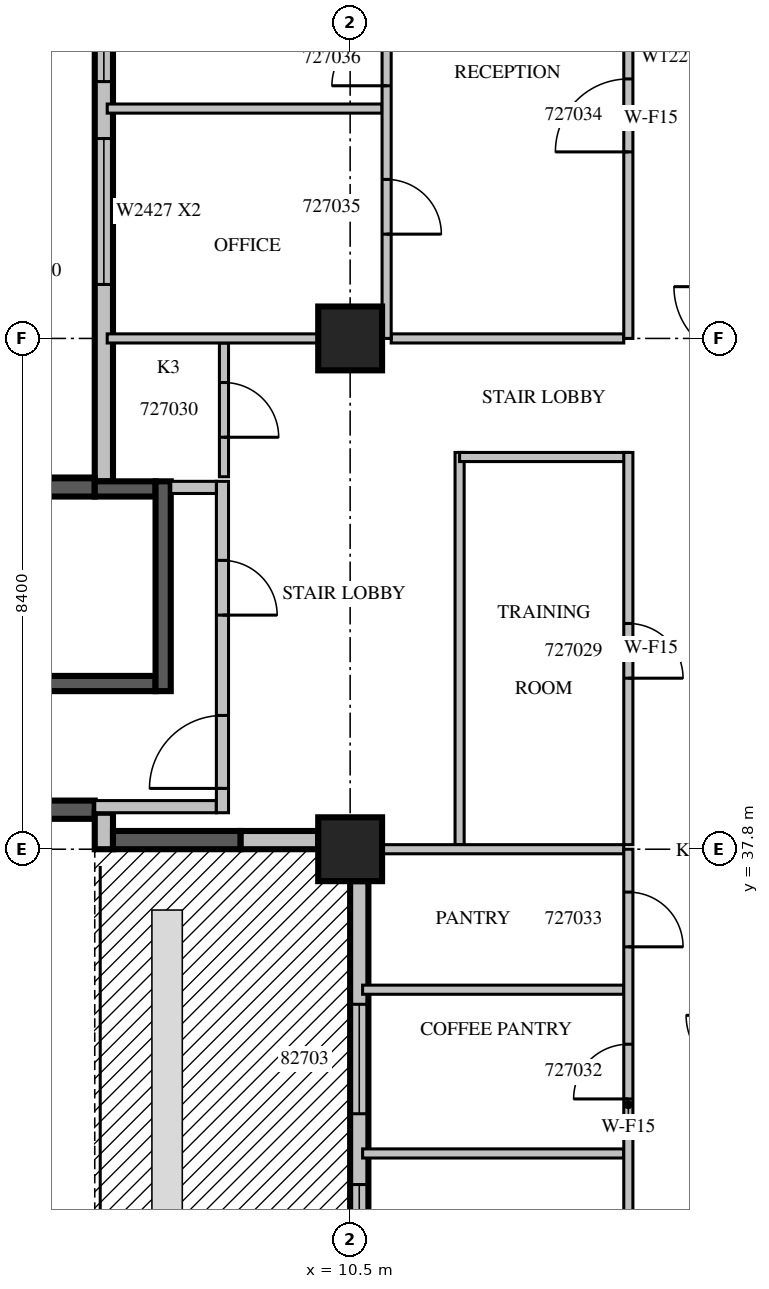
"""IFC4 building model, lengths in metres.
Left out: names, types, materials, properties, quantities, classifications, styles, units other than length and angle.
Written with IfcOpenShell. Run it as: python <this file> out.ifc"""

import sys

from ifc_helpers import new_model, si_unit, direction, frame, frame_2d, origin, origin_2d, place, context, subcontext, project, spatial, rectangle, extrude, source, transform, mapped, element, fill, save


model = new_model("IFC4")
c1 = context("Model", 3, precision=1e-05, world=origin(), true_north=direction((0.0, 1.0)))
c2 = subcontext(c1, "Body", "Model", "MODEL_VIEW")
j1 = project(units=[si_unit("LENGTHUNIT", "METRE"), si_unit("PLANEANGLEUNIT", "RADIAN")], contexts=[c1])
p1 = place(None, origin())
s1 = spatial("IfcSite", under=j1, at=p1, CompositionType="ELEMENT")
p2 = place(p1, origin())
s2 = spatial("IfcBuilding", under=s1, at=p2, CompositionType="ELEMENT")
p3 = place(p2, frame((0.0, 0.0, 124.5)))
s3 = spatial("IfcBuildingStorey", under=s2, at=p3, CompositionType="ELEMENT", Elevation=124.5)
m1 = source(origin(), c2, "Body", "SweptSolid", [
    extrude(rectangle(XDim=1.05, YDim=1.05, at=origin_2d()), origin(), (0.0, 0.0, 1.0), 4.2),
])
for number, where, z_axis, x_axis in (
    (1, (10.5, 37.8, 0.0), (0.0, 0.0, 1.0), (1.0, 0.0, 0.0)),
    (2, (10.5, 46.2, 0.0), (0.0, 0.0, 1.0), (1.0, 0.0, 0.0)),
):
    element("IfcColumn", number, at=place(p3, frame(where, z_axis=z_axis, x_axis=x_axis)), inside=s3, PredefinedType="COLUMN", context=c2, shape_type="MappedRepresentation", body=[
        mapped(m1, transform((0.0, 0.0, 0.0), scale=1.0)),
    ])
m2 = source(origin(), c2, "Body", "SweptSolid", [
    extrude(rectangle(XDim=9.91, YDim=0.3, at=frame_2d((4.955, 0.0))), origin(), (0.0, 0.0, 1.0), 3.8),
])
p4 = place(p3, frame((6.45, 53.76, 0.0), z_axis=(0.0, 0.0, 1.0), x_axis=(0.0, -1.0, 0.0)))
e3 = element("IfcWall", 3, at=p4, inside=s3, PredefinedType="STANDARD", context=c2, shape_type="MappedRepresentation", body=[
    mapped(m2, transform((0.0, 0.0, 0.0), scale=1.0)),
])
m3 = source(origin(), c2, "Body", "SweptSolid", [
    extrude(rectangle(XDim=2.4, YDim=2.7, at=frame_2d((1.2, 1.35))), frame((0.0, 0.16, 0.0), z_axis=(0.0, -1.0, 0.0), x_axis=(1.0, 0.0, 0.0)), (0.0, 0.0, 1.0), 0.32),
])
p5 = place(p4, frame((4.272, 0.0, 0.6)))
e4 = element("IfcOpeningElement", 4, at=p5, cuts=e3, PredefinedType="OPENING", context=c2, shape_type="MappedRepresentation", body=[
    mapped(m3, transform((0.0, 0.0, 0.0), scale=1.0)),
])
p6 = place(p4, frame((0.936, 0.0, 0.6)))
e5 = element("IfcOpeningElement", 5, at=p6, cuts=e3, PredefinedType="OPENING", context=c2, shape_type="MappedRepresentation", body=[
    mapped(m3, transform((0.0, 0.0, 0.0), scale=1.0)),
])
m4 = source(origin(), c2, "Body", "SweptSolid", [
    extrude(rectangle(XDim=6.1, YDim=0.3, at=frame_2d((3.05, 0.0))), origin(), (0.0, 0.0, 1.0), 3.8),
])
for number, where, z_axis, x_axis in (
    (6, (6.3, 43.75, 0.0), (0.0, 0.0, 1.0), (-1.0, 0.0, 0.0)),
    (7, (0.2, 38.45, 0.0), (0.0, 0.0, 1.0), (1.0, 0.0, 0.0)),
):
    element("IfcWall", number, at=place(p3, frame(where, z_axis=z_axis, x_axis=x_axis)), inside=s3, PredefinedType="SOLIDWALL", context=c2, shape_type="MappedRepresentation", body=[
        mapped(m4, transform((0.0, 0.0, 0.0), scale=1.0)),
    ])
p7 = place(p3, frame((6.45, 38.4, 0.0), z_axis=(0.0, 0.0, 1.0), x_axis=(0.0, -1.0, 0.0)))
e8 = element("IfcWall", 8, at=p7, inside=s3, PredefinedType="STANDARD", context=c2, shape_type="SweptSolid", body=[
    extrude(rectangle(XDim=0.6, YDim=0.3, at=frame_2d((0.3, 0.0))), origin(), (0.0, 0.0, 1.0), 3.8),
])
p8 = place(p3, frame((6.6, 37.95, 0.0), z_axis=(0.0, 0.0, 1.0), x_axis=(1.0, 0.0, 0.0)))
e9 = element("IfcWall", 9, at=p8, inside=s3, PredefinedType="SOLIDWALL", context=c2, shape_type="SweptSolid", body=[
    extrude(rectangle(XDim=2.1, YDim=0.3, at=frame_2d((1.05, 0.0))), origin(), (0.0, 0.0, 1.0), 3.8),
])
p9 = place(p3, frame((8.7, 37.95, 0.0), z_axis=(0.0, 0.0, 1.0), x_axis=(1.0, 0.0, 0.0)))
e10 = element("IfcWall", 10, at=p9, inside=s3, PredefinedType="STANDARD", context=c2, shape_type="SweptSolid", body=[
    extrude(rectangle(XDim=1.275, YDim=0.3, at=frame_2d((0.637, 0.0))), origin(), (0.0, 0.0, 1.0), 3.8),
])
m5 = source(origin(), c2, "Body", "SweptSolid", [
    extrude(rectangle(XDim=7.35, YDim=0.3, at=frame_2d((3.675, 0.0))), origin(), (0.0, 0.0, 1.0), 3.8),
])
p10 = place(p3, frame((10.65, 37.275, 0.0), z_axis=(0.0, 0.0, 1.0), x_axis=(0.0, -1.0, 0.0)))
e11 = element("IfcWall", 11, at=p10, inside=s3, PredefinedType="STANDARD", context=c2, shape_type="MappedRepresentation", body=[
    mapped(m5, transform((0.0, 0.0, 0.0), scale=1.0)),
])
m6 = source(origin(), c2, "Body", "SweptSolid", [
    extrude(rectangle(XDim=1.8, YDim=2.4, at=frame_2d((0.9, 1.2))), frame((0.0, 0.16, 0.0), z_axis=(0.0, -1.0, 0.0), x_axis=(1.0, 0.0, 0.0)), (0.0, 0.0, 1.0), 0.32),
])
p11 = place(p10, frame((2.025, 0.0, 0.0)))
e12 = element("IfcOpeningElement", 12, at=p11, cuts=e11, PredefinedType="OPENING", context=c2, shape_type="MappedRepresentation", body=[
    mapped(m6, transform((0.0, 0.0, 0.0), scale=1.0)),
])
m7 = source(origin(), c2, "Body", "SweptSolid", [
    extrude(rectangle(XDim=1.2, YDim=2.7, at=frame_2d((0.6, 1.35))), frame((0.0, 0.16, 0.0), z_axis=(0.0, -1.0, 0.0), x_axis=(1.0, 0.0, 0.0)), (0.0, 0.0, 1.0), 0.32),
])
p12 = place(p10, frame((4.989, 0.0, 0.6)))
e13 = element("IfcOpeningElement", 13, at=p12, cuts=e11, PredefinedType="OPENING", context=c2, shape_type="MappedRepresentation", body=[
    mapped(m7, transform((0.0, 0.0, 0.0), scale=1.0)),
])
m8 = source(origin(), c2, "Body", "SweptSolid", [
    extrude(rectangle(XDim=7.0, YDim=0.25, at=frame_2d((3.5, 0.0))), origin(), (0.0, 0.0, 1.0), 3.8),
])
p13 = place(p3, frame((0.3, 40.525, 0.0), z_axis=(0.0, 0.0, 1.0), x_axis=(1.0, 0.0, 0.0)))
e14 = element("IfcWall", 14, at=p13, inside=s3, PredefinedType="SOLIDWALL", context=c2, shape_type="MappedRepresentation", body=[
    mapped(m8, transform((0.0, 0.0, 0.0), scale=1.0)),
])
m9 = source(origin(), c2, "Body", "SweptSolid", [
    extrude(rectangle(XDim=1.1, YDim=2.1, at=frame_2d((0.55, 1.05))), frame((0.0, 0.135, 0.0), z_axis=(0.0, -1.0, 0.0), x_axis=(1.0, 0.0, 0.0)), (0.0, 0.0, 1.0), 0.27),
])
p14 = place(p13, frame((0.55, 0.0, 0.0)))
e15 = element("IfcOpeningElement", 15, at=p14, cuts=e14, PredefinedType="OPENING", context=c2, shape_type="MappedRepresentation", body=[
    mapped(m9, transform((0.0, 0.0, 0.0), scale=1.0)),
])
m10 = source(origin(), c2, "Body", "SweptSolid", [
    extrude(rectangle(XDim=1.0, YDim=0.25, at=frame_2d((0.5, 0.0))), origin(), (0.0, 0.0, 1.0), 3.8),
])
p15 = place(p3, frame((6.3, 43.725, 0.0), z_axis=(0.0, 0.0, 1.0), x_axis=(1.0, 0.0, 0.0)))
e16 = element("IfcWall", 16, at=p15, inside=s3, PredefinedType="SOLIDWALL", context=c2, shape_type="MappedRepresentation", body=[
    mapped(m10, transform((0.0, 0.0, 0.0), scale=1.0)),
])
m11 = source(origin(), c2, "Body", "SweptSolid", [
    extrude(rectangle(XDim=3.45, YDim=0.25, at=frame_2d((1.725, 0.0))), origin(), (0.0, 0.0, 1.0), 3.8),
])
p16 = place(p3, frame((7.425, 40.4, 0.0), z_axis=(0.0, 0.0, 1.0), x_axis=(0.0, 1.0, 0.0)))
e17 = element("IfcWall", 17, at=p16, inside=s3, PredefinedType="SOLIDWALL", context=c2, shape_type="MappedRepresentation", body=[
    mapped(m11, transform((0.0, 0.0, 0.0), scale=1.0)),
])
m12 = source(origin(), c2, "Body", "SweptSolid", [
    extrude(rectangle(XDim=2.0, YDim=0.2, at=frame_2d((1.0, 0.0))), origin(), (0.0, 0.0, 1.0), 3.8),
])
p17 = place(p3, frame((6.3, 38.5, 0.0), z_axis=(0.0, 0.0, 1.0), x_axis=(1.0, 0.0, 0.0)))
e18 = element("IfcWall", 18, at=p17, inside=s3, PredefinedType="PARTITIONING", context=c2, shape_type="MappedRepresentation", body=[
    mapped(m12, transform((0.0, 0.0, 0.0), scale=1.0)),
])
m13 = source(origin(), c2, "Body", "SweptSolid", [
    extrude(rectangle(XDim=5.45, YDim=0.2, at=frame_2d((2.725, 0.0))), origin(), (0.0, 0.0, 1.0), 3.8),
])
p18 = place(p3, frame((8.4, 38.4, 0.0), z_axis=(0.0, 0.0, 1.0), x_axis=(0.0, 1.0, 0.0)))
e19 = element("IfcWall", 19, at=p18, inside=s3, PredefinedType="PARTITIONING", context=c2, shape_type="MappedRepresentation", body=[
    mapped(m13, transform((0.0, 0.0, 0.0), scale=1.0)),
])
m14 = source(origin(), c2, "Body", "SweptSolid", [
    extrude(rectangle(XDim=1.2, YDim=2.1, at=frame_2d((0.6, 1.05))), frame((0.0, 0.11, 0.0), z_axis=(0.0, -1.0, 0.0), x_axis=(1.0, 0.0, 0.0)), (0.0, 0.0, 1.0), 0.22),
])
p19 = place(p18, frame((0.4, 0.0, 0.0)))
e20 = element("IfcOpeningElement", 20, at=p19, cuts=e19, PredefinedType="OPENING", context=c2, shape_type="MappedRepresentation", body=[
    mapped(m14, transform((0.0, 0.0, 0.0), scale=1.0)),
])
m15 = source(origin(), c2, "Body", "SweptSolid", [
    extrude(rectangle(XDim=0.9, YDim=2.1, at=frame_2d((0.45, 1.05))), frame((0.0, 0.11, 0.0), z_axis=(0.0, -1.0, 0.0), x_axis=(1.0, 0.0, 0.0)), (0.0, 0.0, 1.0), 0.22),
])
p20 = place(p18, frame((3.25, 0.0, 0.0)))
e21 = element("IfcOpeningElement", 21, at=p20, cuts=e19, PredefinedType="OPENING", context=c2, shape_type="MappedRepresentation", body=[
    mapped(m15, transform((0.0, 0.0, 0.0), scale=1.0)),
])
m16 = source(origin(), c2, "Body", "SweptSolid", [
    extrude(rectangle(XDim=0.75, YDim=0.2, at=frame_2d((0.375, 0.0))), origin(), (0.0, 0.0, 1.0), 3.8),
])
p21 = place(p3, frame((7.55, 43.75, 0.0), z_axis=(0.0, 0.0, 1.0), x_axis=(1.0, 0.0, 0.0)))
e22 = element("IfcWall", 22, at=p21, inside=s3, PredefinedType="PARTITIONING", context=c2, shape_type="MappedRepresentation", body=[
    mapped(m16, transform((0.0, 0.0, 0.0), scale=1.0)),
])
m17 = source(origin(), c2, "Body", "SweptSolid", [
    extrude(rectangle(XDim=6.45, YDim=0.15, at=frame_2d((3.225, 0.0))), origin(), (0.0, 0.0, 1.0), 3.8),
])
p22 = place(p3, frame((12.3, 44.325, 0.0), z_axis=(0.0, 0.0, 1.0), x_axis=(0.0, -1.0, 0.0)))
e23 = element("IfcWall", 23, at=p22, inside=s3, PredefinedType="PARTITIONING", context=c2, shape_type="MappedRepresentation", body=[
    mapped(m17, transform((0.0, 0.0, 0.0), scale=1.0)),
])
m18 = source(origin(), c2, "Body", "SweptSolid", [
    extrude(rectangle(XDim=2.775, YDim=0.15, at=frame_2d((1.387, 0.0))), origin(), (0.0, 0.0, 1.0), 3.8),
])
p23 = place(p3, frame((15.075, 44.25, 0.0), z_axis=(0.0, 0.0, 1.0), x_axis=(-1.0, 0.0, 0.0)))
e24 = element("IfcWall", 24, at=p23, inside=s3, PredefinedType="PARTITIONING", context=c2, shape_type="MappedRepresentation", body=[
    mapped(m18, transform((0.0, 0.0, 0.0), scale=1.0)),
])
p24 = place(p3, frame((15.075, 37.875, 0.0), z_axis=(0.0, 0.0, 1.0), x_axis=(0.0, 1.0, 0.0)))
e25 = element("IfcWall", 25, at=p24, inside=s3, PredefinedType="PARTITIONING", context=c2, shape_type="MappedRepresentation", body=[
    mapped(m17, transform((0.0, 0.0, 0.0), scale=1.0)),
])
m19 = source(origin(), c2, "Body", "SweptSolid", [
    extrude(rectangle(XDim=0.9, YDim=2.1, at=frame_2d((0.45, 1.05))), frame((0.0, 0.085, 0.0), z_axis=(0.0, -1.0, 0.0), x_axis=(1.0, 0.0, 0.0)), (0.0, 0.0, 1.0), 0.17),
])
p25 = place(p24, frame((2.737, 0.0, 0.0)))
e26 = element("IfcOpeningElement", 26, at=p25, cuts=e25, PredefinedType="OPENING", context=c2, shape_type="MappedRepresentation", body=[
    mapped(m19, transform((0.0, 0.0, 0.0), scale=1.0)),
])
m20 = source(origin(), c2, "Body", "SweptSolid", [
    extrude(rectangle(XDim=2.2, YDim=0.15, at=frame_2d((1.1, 0.0))), origin(), (0.0, 0.0, 1.0), 3.8),
])
p26 = place(p3, frame((8.425, 43.925, 0.0), z_axis=(0.0, 0.0, 1.0), x_axis=(0.0, 1.0, 0.0)))
e27 = element("IfcWall", 27, at=p26, inside=s3, PredefinedType="PARTITIONING", context=c2, shape_type="MappedRepresentation", body=[
    mapped(m20, transform((0.0, 0.0, 0.0), scale=1.0)),
])
p27 = place(p26, frame((0.65, 0.0, 0.0)))
e28 = element("IfcOpeningElement", 28, at=p27, cuts=e27, PredefinedType="OPENING", context=c2, shape_type="MappedRepresentation", body=[
    mapped(m19, transform((0.0, 0.0, 0.0), scale=1.0)),
])
m21 = source(origin(), c2, "Body", "SweptSolid", [
    extrude(rectangle(XDim=4.295, YDim=0.15, at=frame_2d((2.147, 0.0))), origin(), (0.0, 0.0, 1.0), 3.8),
])
for number, where, z_axis, x_axis in (
    (29, (15.0, 32.797, 0.0), (0.0, 0.0, 1.0), (-1.0, 0.0, 0.0)),
    (30, (15.0, 35.49, 0.0), (0.0, 0.0, 1.0), (-1.0, 0.0, 0.0)),
):
    element("IfcWall", number, at=place(p3, frame(where, z_axis=z_axis, x_axis=x_axis)), inside=s3, PredefinedType="PARTITIONING", context=c2, shape_type="MappedRepresentation", body=[
        mapped(m21, transform((0.0, 0.0, 0.0), scale=1.0)),
    ])
m22 = source(origin(), c2, "Body", "SweptSolid", [
    extrude(rectangle(XDim=3.976, YDim=0.15, at=frame_2d((1.988, 0.0))), origin(), (0.0, 0.0, 1.0), 3.8),
])
p28 = place(p3, frame((15.0, 37.8, 0.0), z_axis=(0.0, 0.0, 1.0), x_axis=(-1.0, 0.0, 0.0)))
e31 = element("IfcWall", 31, at=p28, inside=s3, PredefinedType="PARTITIONING", context=c2, shape_type="MappedRepresentation", body=[
    mapped(m22, transform((0.0, 0.0, 0.0), scale=1.0)),
])
m23 = source(origin(), c2, "Body", "SweptSolid", [
    extrude(rectangle(XDim=4.52, YDim=0.15, at=frame_2d((2.26, 0.0))), origin(), (0.0, 0.0, 1.0), 3.8),
])
p29 = place(p3, frame((11.025, 49.98, 0.0), z_axis=(0.0, 0.0, 1.0), x_axis=(-1.0, 0.0, 0.0)))
e32 = element("IfcWall", 32, at=p29, inside=s3, PredefinedType="PARTITIONING", context=c2, shape_type="MappedRepresentation", body=[
    mapped(m23, transform((0.0, 0.0, 0.0), scale=1.0)),
])
m24 = source(origin(), c2, "Body", "SweptSolid", [
    extrude(rectangle(XDim=3.471, YDim=0.15, at=frame_2d((1.736, 0.0))), origin(), (0.0, 0.0, 1.0), 3.8),
])
p30 = place(p3, frame((9.976, 46.2, 0.0), z_axis=(0.0, 0.0, 1.0), x_axis=(-1.0, 0.0, 0.0)))
e33 = element("IfcWall", 33, at=p30, inside=s3, PredefinedType="PARTITIONING", context=c2, shape_type="MappedRepresentation", body=[
    mapped(m24, transform((0.0, 0.0, 0.0), scale=1.0)),
])
m25 = source(origin(), c2, "Body", "SweptSolid", [
    extrude(rectangle(XDim=3.825, YDim=0.15, at=frame_2d((1.913, 0.0))), origin(), (0.0, 0.0, 1.0), 3.8),
])
p31 = place(p3, frame((15.0, 46.2, 0.0), z_axis=(0.0, 0.0, 1.0), x_axis=(-1.0, 0.0, 0.0)))
e34 = element("IfcWall", 34, at=p31, inside=s3, PredefinedType="PARTITIONING", context=c2, shape_type="MappedRepresentation", body=[
    mapped(m25, transform((0.0, 0.0, 0.0), scale=1.0)),
])
m26 = source(origin(), c2, "Body", "SweptSolid", [
    extrude(rectangle(XDim=7.26, YDim=0.15, at=frame_2d((3.63, 0.0))), origin(), (0.0, 0.0, 1.0), 3.8),
])
p32 = place(p3, frame((11.1, 46.2, 0.0), z_axis=(0.0, 0.0, 1.0), x_axis=(0.0, 1.0, 0.0)))
e35 = element("IfcWall", 35, at=p32, inside=s3, PredefinedType="PARTITIONING", context=c2, shape_type="MappedRepresentation", body=[
    mapped(m26, transform((0.0, 0.0, 0.0), scale=1.0)),
])
p33 = place(p32, frame((1.715, 0.0, 0.0)))
e36 = element("IfcOpeningElement", 36, at=p33, cuts=e35, PredefinedType="OPENING", context=c2, shape_type="MappedRepresentation", body=[
    mapped(m19, transform((0.0, 0.0, 0.0), scale=1.0)),
])
p34 = place(p32, frame((4.155, 0.0, 0.0)))
e37 = element("IfcOpeningElement", 37, at=p34, cuts=e35, PredefinedType="OPENING", context=c2, shape_type="MappedRepresentation", body=[
    mapped(m19, transform((0.0, 0.0, 0.0), scale=1.0)),
])
m27 = source(origin(), c2, "Body", "SweptSolid", [
    extrude(rectangle(XDim=8.4, YDim=0.15, at=frame_2d((4.2, 0.0))), origin(), (0.0, 0.0, 1.0), 3.8),
])
p35 = place(p3, frame((15.075, 29.4, 0.0), z_axis=(0.0, 0.0, 1.0), x_axis=(0.0, 1.0, 0.0)))
e38 = element("IfcWall", 38, at=p35, inside=s3, PredefinedType="PARTITIONING", context=c2, shape_type="MappedRepresentation", body=[
    mapped(m27, transform((0.0, 0.0, 0.0), scale=1.0)),
])
m28 = source(origin(), c2, "Body", "SweptSolid", [
    extrude(rectangle(XDim=1.1, YDim=2.1, at=frame_2d((0.55, 1.05))), frame((0.0, 0.085, 0.0), z_axis=(0.0, -1.0, 0.0), x_axis=(1.0, 0.0, 0.0)), (0.0, 0.0, 1.0), 0.17),
])
p36 = place(p35, frame((1.149, 0.0, 0.0)))
e39 = element("IfcOpeningElement", 39, at=p36, cuts=e38, PredefinedType="OPENING", context=c2, shape_type="MappedRepresentation", body=[
    mapped(m28, transform((0.0, 0.0, 0.0), scale=1.0)),
])
p37 = place(p35, frame((4.293, 0.0, 0.0)))
e40 = element("IfcOpeningElement", 40, at=p37, cuts=e38, PredefinedType="OPENING", context=c2, shape_type="MappedRepresentation", body=[
    mapped(m19, transform((0.0, 0.0, 0.0), scale=1.0)),
])
p38 = place(p35, frame((6.795, 0.0, 0.0)))
e41 = element("IfcOpeningElement", 41, at=p38, cuts=e38, PredefinedType="OPENING", context=c2, shape_type="MappedRepresentation", body=[
    mapped(m19, transform((0.0, 0.0, 0.0), scale=1.0)),
])
p39 = place(p3, frame((15.075, 46.2, 0.0), z_axis=(0.0, 0.0, 1.0), x_axis=(0.0, 1.0, 0.0)))
e42 = element("IfcWall", 42, at=p39, inside=s3, PredefinedType="PARTITIONING", context=c2, shape_type="MappedRepresentation", body=[
    mapped(m26, transform((0.0, 0.0, 0.0), scale=1.0)),
])
m29 = source(origin(), c2, "Body", "SweptSolid", [
    extrude(rectangle(XDim=1.2, YDim=2.1, at=frame_2d((0.6, 1.05))), frame((0.0, 0.085, 0.0), z_axis=(0.0, -1.0, 0.0), x_axis=(1.0, 0.0, 0.0)), (0.0, 0.0, 1.0), 0.17),
])
p40 = place(p39, frame((3.067, 0.0, 0.0)))
e43 = element("IfcOpeningElement", 43, at=p40, cuts=e42, PredefinedType="OPENING", context=c2, shape_type="MappedRepresentation", body=[
    mapped(m29, transform((0.0, 0.0, 0.0), scale=1.0)),
])
m30 = source(origin(), c2, "Body", "SweptSolid", [
    extrude(rectangle(XDim=2.4, YDim=2.7, at=frame_2d((1.2, 1.35))), frame((0.0, 0.03, 0.0), z_axis=(0.0, -1.0, 0.0), x_axis=(1.0, 0.0, 0.0)), (0.0, 0.0, 1.0), 0.06),
])
p41 = place(p5, origin())
e44 = element("IfcWindow", 44, at=p41, inside=s3, PartitioningType="SINGLE_PANEL", PredefinedType="WINDOW", context=c2, shape_type="MappedRepresentation", body=[
    mapped(m30, transform((0.0, 0.0, 0.0), scale=1.0)),
])
fill(e4, e44)
p42 = place(p6, origin())
e45 = element("IfcWindow", 45, at=p42, inside=s3, PartitioningType="SINGLE_PANEL", PredefinedType="WINDOW", context=c2, shape_type="MappedRepresentation", body=[
    mapped(m30, transform((0.0, 0.0, 0.0), scale=1.0)),
])
fill(e5, e45)
m31 = source(origin(), c2, "Body", "SweptSolid", [
    extrude(rectangle(XDim=1.8, YDim=2.4, at=frame_2d((0.9, 1.2))), frame((0.0, 0.025, 0.0), z_axis=(0.0, -1.0, 0.0), x_axis=(1.0, 0.0, 0.0)), (0.0, 0.0, 1.0), 0.05),
])
p43 = place(p11, origin())
e46 = element("IfcDoor", 46, at=p43, inside=s3, OperationType="SLIDING_TO_LEFT", PredefinedType="DOOR", context=c2, shape_type="MappedRepresentation", body=[
    mapped(m31, transform((0.0, 0.0, 0.0), scale=1.0)),
])
fill(e12, e46)
m32 = source(origin(), c2, "Body", "SweptSolid", [
    extrude(rectangle(XDim=1.2, YDim=2.7, at=frame_2d((0.6, 1.35))), frame((0.0, 0.03, 0.0), z_axis=(0.0, -1.0, 0.0), x_axis=(1.0, 0.0, 0.0)), (0.0, 0.0, 1.0), 0.06),
])
p44 = place(p12, origin())
e47 = element("IfcWindow", 47, at=p44, inside=s3, PartitioningType="SINGLE_PANEL", PredefinedType="WINDOW", context=c2, shape_type="MappedRepresentation", body=[
    mapped(m32, transform((0.0, 0.0, 0.0), scale=1.0)),
])
fill(e13, e47)
m33 = source(origin(), c2, "Body", "SweptSolid", [
    extrude(rectangle(XDim=1.2, YDim=2.1, at=frame_2d((0.6, 1.05))), frame((0.0, 0.025, 0.0), z_axis=(0.0, -1.0, 0.0), x_axis=(1.0, 0.0, 0.0)), (0.0, 0.0, 1.0), 0.05),
])
p45 = place(p19, origin())
e48 = element("IfcDoor", 48, at=p45, inside=s3, OperationType="SINGLE_SWING_LEFT", PredefinedType="DOOR", context=c2, shape_type="MappedRepresentation", body=[
    mapped(m33, transform((0.0, 0.0, 0.0), scale=1.0)),
])
fill(e20, e48)
m34 = source(origin(), c2, "Body", "SweptSolid", [
    extrude(rectangle(XDim=0.9, YDim=2.1, at=frame_2d((0.45, 1.05))), frame((0.0, 0.025, 0.0), z_axis=(0.0, -1.0, 0.0), x_axis=(1.0, 0.0, 0.0)), (0.0, 0.0, 1.0), 0.05),
])
p46 = place(p20, origin())
e49 = element("IfcDoor", 49, at=p46, inside=s3, OperationType="SINGLE_SWING_RIGHT", PredefinedType="DOOR", context=c2, shape_type="MappedRepresentation", body=[
    mapped(m34, transform((0.0, 0.0, 0.0), scale=1.0)),
])
fill(e21, e49)
p47 = place(p25, origin())
e50 = element("IfcDoor", 50, at=p47, inside=s3, OperationType="SINGLE_SWING_RIGHT", PredefinedType="DOOR", context=c2, shape_type="MappedRepresentation", body=[
    mapped(m34, transform((0.0, 0.0, 0.0), scale=1.0)),
])
fill(e26, e50)
p48 = place(p27, origin())
e51 = element("IfcDoor", 51, at=p48, inside=s3, OperationType="SINGLE_SWING_RIGHT", PredefinedType="DOOR", context=c2, shape_type="MappedRepresentation", body=[
    mapped(m34, transform((0.0, 0.0, 0.0), scale=1.0)),
])
fill(e28, e51)
p49 = place(p37, origin())
e52 = element("IfcDoor", 52, at=p49, inside=s3, OperationType="SINGLE_SWING_LEFT", PredefinedType="DOOR", context=c2, shape_type="MappedRepresentation", body=[
    mapped(m34, transform((0.0, 0.0, 0.0), scale=1.0)),
])
fill(e40, e52)
p50 = place(p38, origin())
e53 = element("IfcDoor", 53, at=p50, inside=s3, OperationType="SINGLE_SWING_RIGHT", PredefinedType="DOOR", context=c2, shape_type="MappedRepresentation", body=[
    mapped(m34, transform((0.0, 0.0, 0.0), scale=1.0)),
])
fill(e41, e53)
p51 = place(p40, origin())
e54 = element("IfcDoor", 54, at=p51, inside=s3, OperationType="SINGLE_SWING_LEFT", PredefinedType="DOOR", context=c2, shape_type="MappedRepresentation", body=[
    mapped(m33, transform((0.0, 0.0, 0.0), scale=1.0)),
])
fill(e43, e54)
p52 = place(p33, origin())
e55 = element("IfcDoor", 55, at=p52, inside=s3, OperationType="SINGLE_SWING_RIGHT", PredefinedType="DOOR", context=c2, shape_type="MappedRepresentation", body=[
    mapped(m34, transform((0.0, 0.0, 0.0), scale=1.0)),
])
fill(e36, e55)
p53 = place(p34, origin())
e56 = element("IfcDoor", 56, at=p53, inside=s3, OperationType="SINGLE_SWING_LEFT", PredefinedType="DOOR", context=c2, shape_type="MappedRepresentation", body=[
    mapped(m34, transform((0.0, 0.0, 0.0), scale=1.0)),
])
fill(e37, e56)
save(model, sys.argv[1])
